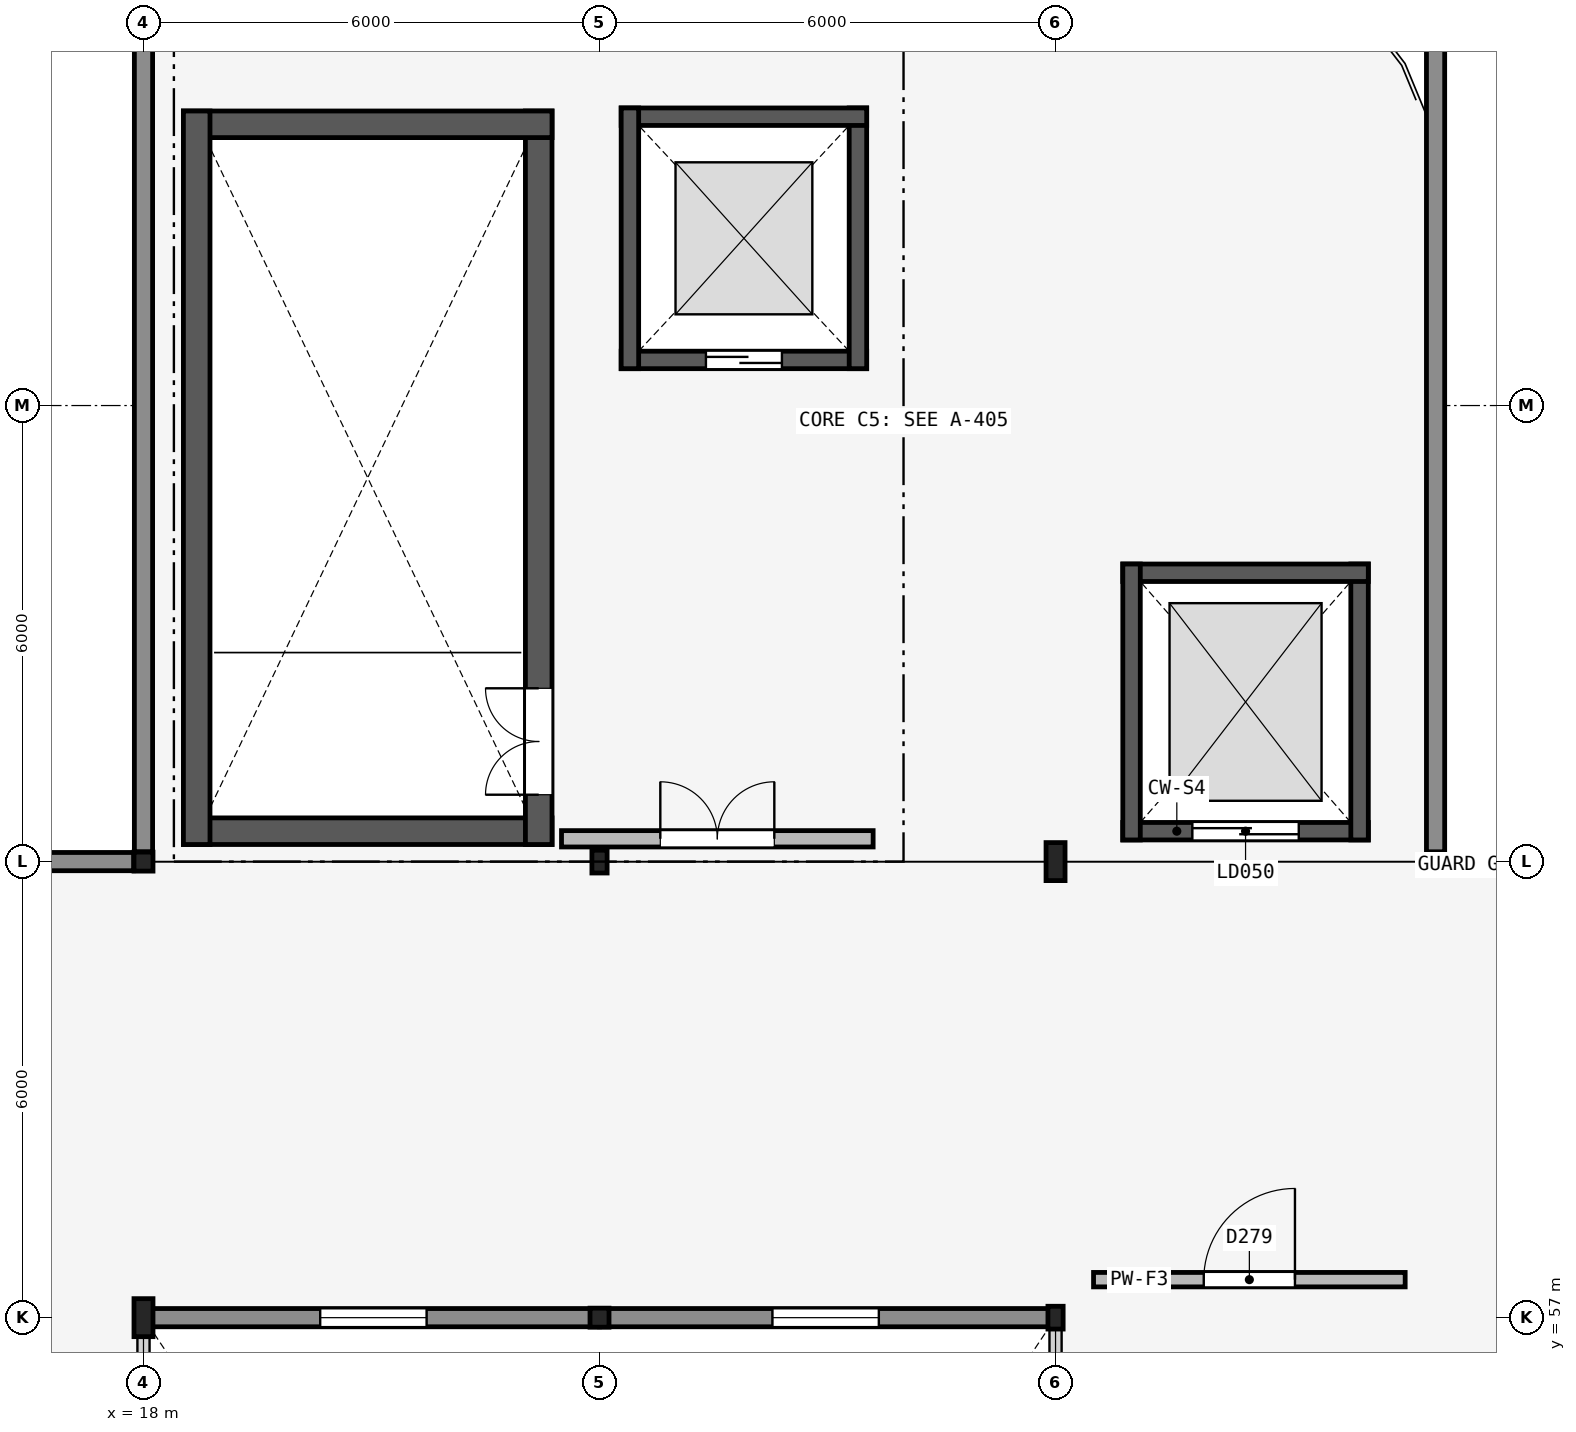
"""IFC4 building model, lengths in metres.
Left out: names, types, materials, properties, quantities, classifications, styles, units other than length and angle.
Written with IfcOpenShell. Run it as: python <this file> out.ifc"""

import sys

from ifc_helpers import new_model, si_unit, direction, frame, frame_2d, origin, origin_2d, place, context, subcontext, project, spatial, rectangle, hollow_rectangle, i_section, extrude, element, fill, save


model = new_model("IFC4")
c1 = context("Model", 3, precision=1e-05, world=origin(), true_north=direction((0.0, 1.0)))
c2 = subcontext(c1, "Body", "Model", "MODEL_VIEW")
j1 = project(units=[si_unit("LENGTHUNIT", "METRE"), si_unit("PLANEANGLEUNIT", "RADIAN")], contexts=[c1])
p1 = place(None, origin())
s1 = spatial("IfcSite", under=j1, at=p1, CompositionType="ELEMENT")
p2 = place(p1, origin())
s2 = spatial("IfcBuilding", under=s1, at=p2, CompositionType="ELEMENT")
p3 = place(p2, frame((0.0, 0.0, 22.2)))
s3 = spatial("IfcBuildingStorey", under=s2, at=p3, CompositionType="ELEMENT", Elevation=22.2)
p4 = place(p3, frame((18.0, 57.0, 0.0), z_axis=(0.0, 0.0, 1.0), x_axis=(1.0, 0.0, 0.0)))
e1 = element("IfcColumn", 1, at=p4, inside=s3, PredefinedType="COLUMN", context=c2, shape_type="SweptSolid", body=[
    extrude(i_section(OverallWidth=0.25, OverallDepth=0.5, WebThickness=0.01, FlangeThickness=0.015, FilletRadius=0.015, at=origin_2d()), origin(), (0.0, 0.0, 1.0), 3.9),
])
for number, where, z_axis, x_axis in (
    (2, (18.0, 63.0, 0.0), (0.0, 0.0, 1.0), (1.0, 0.0, 0.0)),
    (3, (24.0, 57.0, 0.0), (0.0, 0.0, 1.0), (1.0, 0.0, 0.0)),
):
    element("IfcColumn", number, at=place(p3, frame(where, z_axis=z_axis, x_axis=x_axis)), inside=s3, PredefinedType="COLUMN", context=c2, shape_type="SweptSolid", body=[
        extrude(hollow_rectangle(XDim=0.25, YDim=0.25, WallThickness=0.012, InnerFilletRadius=0.012, OuterFilletRadius=0.024, at=origin_2d()), origin(), (0.0, 0.0, 1.0), 3.9),
    ])
for number, where, z_axis, x_axis in (
    (4, (24.0, 63.0, 0.0), (0.0, 0.0, 1.0), (1.0, 0.0, 0.0)),
    (5, (30.0, 57.0, 0.0), (0.0, 0.0, 1.0), (1.0, 0.0, 0.0)),
):
    element("IfcColumn", number, at=place(p3, frame(where, z_axis=z_axis, x_axis=x_axis)), inside=s3, PredefinedType="COLUMN", context=c2, shape_type="SweptSolid", body=[
        extrude(hollow_rectangle(XDim=0.2, YDim=0.3, WallThickness=0.012, InnerFilletRadius=0.012, OuterFilletRadius=0.024, at=origin_2d()), origin(), (0.0, 0.0, 1.0), 3.9),
    ])
p5 = place(p3, frame((30.0, 63.0, 0.0), z_axis=(0.0, 0.0, 1.0), x_axis=(1.0, 0.0, 0.0)))
e6 = element("IfcColumn", 6, at=p5, inside=s3, PredefinedType="COLUMN", context=c2, shape_type="SweptSolid", body=[
    extrude(i_section(OverallWidth=0.25, OverallDepth=0.5, WebThickness=0.01, FlangeThickness=0.015, FilletRadius=0.015, at=origin_2d()), origin(), (0.0, 0.0, 1.0), 3.9),
])
p6 = place(p3, frame((12.129, 63.0, 0.0), z_axis=(0.0, 0.0, 1.0), x_axis=(1.0, 0.0, 0.0)))
e7 = element("IfcWall", 7, at=p6, inside=s3, PredefinedType="SOLIDWALL", context=c2, shape_type="SweptSolid", body=[
    extrude(rectangle(XDim=5.742, YDim=0.24, at=frame_2d((2.871, 0.0))), origin(), (0.0, 0.0, 1.0), 3.08),
])
p7 = place(p6, frame((2.421, 0.0, 1.0)))
e8 = element("IfcOpeningElement", 8, at=p7, cuts=e7, PredefinedType="OPENING", context=c2, shape_type="SweptSolid", body=[
    extrude(rectangle(XDim=0.9, YDim=1.5, at=frame_2d((0.45, 0.75))), frame((0.0, 0.13, 0.0), z_axis=(0.0, -1.0, 0.0), x_axis=(1.0, 0.0, 0.0)), (0.0, 0.0, 1.0), 0.26),
])
p8 = place(p3, frame((18.05, 57.0, 0.0), z_axis=(0.0, 0.0, 1.0), x_axis=(1.0, 0.0, 0.0)))
e9 = element("IfcWall", 9, at=p8, inside=s3, PredefinedType="SOLIDWALL", context=c2, shape_type="SweptSolid", body=[
    extrude(rectangle(XDim=5.95, YDim=0.24, at=frame_2d((2.975, 0.0))), origin(), (0.0, 0.0, 1.0), 3.08),
])
p9 = place(p8, frame((2.275, 0.0, 0.85)))
e10 = element("IfcOpeningElement", 10, at=p9, cuts=e9, PredefinedType="OPENING", context=c2, shape_type="SweptSolid", body=[
    extrude(rectangle(XDim=1.4, YDim=1.8, at=frame_2d((0.7, 0.9))), frame((0.0, 0.13, 0.0), z_axis=(0.0, -1.0, 0.0), x_axis=(1.0, 0.0, 0.0)), (0.0, 0.0, 1.0), 0.26),
])
p10 = place(p3, frame((24.0, 57.0, 0.0), z_axis=(0.0, 0.0, 1.0), x_axis=(1.0, 0.0, 0.0)))
e11 = element("IfcWall", 11, at=p10, inside=s3, PredefinedType="SOLIDWALL", context=c2, shape_type="SweptSolid", body=[
    extrude(rectangle(XDim=5.95, YDim=0.24, at=frame_2d((2.975, 0.0))), origin(), (0.0, 0.0, 1.0), 3.13),
])
p11 = place(p10, frame((2.275, 0.0, 0.85)))
e12 = element("IfcOpeningElement", 12, at=p11, cuts=e11, PredefinedType="OPENING", context=c2, shape_type="SweptSolid", body=[
    extrude(rectangle(XDim=1.4, YDim=1.8, at=frame_2d((0.7, 0.9))), frame((0.0, 0.13, 0.0), z_axis=(0.0, -1.0, 0.0), x_axis=(1.0, 0.0, 0.0)), (0.0, 0.0, 1.0), 0.26),
])
p12 = place(p3, frame((35.0, 63.129, 0.0), z_axis=(0.0, 0.0, 1.0), x_axis=(0.0, 1.0, 0.0)))
e13 = element("IfcWall", 13, at=p12, inside=s3, PredefinedType="SOLIDWALL", context=c2, shape_type="SweptSolid", body=[
    extrude(rectangle(XDim=11.746, YDim=0.24, at=frame_2d((5.873, 0.0))), origin(), (0.0, 0.0, 1.0), 3.28),
])
p13 = place(p3, frame((18.0, 63.129, 0.0), z_axis=(0.0, 0.0, 1.0), x_axis=(0.0, 1.0, 0.0)))
e14 = element("IfcWall", 14, at=p13, inside=s3, PredefinedType="SOLIDWALL", context=c2, shape_type="SweptSolid", body=[
    extrude(rectangle(XDim=11.746, YDim=0.24, at=frame_2d((5.873, 0.0))), origin(), (0.0, 0.0, 1.0), 3.08),
])
p14 = place(p3, frame((18.525, 63.4, 0.0), z_axis=(0.0, 0.0, 1.0), x_axis=(1.0, 0.0, 0.0)))
e15 = element("IfcWall", 15, at=p14, inside=s3, PredefinedType="SHEAR", context=c2, shape_type="SweptSolid", body=[
    extrude(rectangle(XDim=4.85, YDim=0.35, at=frame_2d((2.425, 0.0))), origin(), (0.0, 0.0, 1.0), 3.76),
])
p15 = place(p3, frame((23.2, 63.225, 0.0), z_axis=(0.0, 0.0, 1.0), x_axis=(0.0, 1.0, 0.0)))
e16 = element("IfcWall", 16, at=p15, inside=s3, PredefinedType="SHEAR", context=c2, shape_type="SweptSolid", body=[
    extrude(rectangle(XDim=9.65, YDim=0.35, at=frame_2d((4.825, 0.0))), origin(), (0.0, 0.0, 1.0), 3.76),
])
p16 = place(p15, frame((0.655, 0.0, 0.0)))
e17 = element("IfcOpeningElement", 17, at=p16, cuts=e16, PredefinedType="OPENING", context=c2, shape_type="SweptSolid", body=[
    extrude(rectangle(XDim=1.4, YDim=2.2, at=frame_2d((0.7, 1.1))), frame((0.0, 0.185, 0.0), z_axis=(0.0, -1.0, 0.0), x_axis=(1.0, 0.0, 0.0)), (0.0, 0.0, 1.0), 0.37),
])
p17 = place(p3, frame((23.375, 72.7, 0.0), z_axis=(0.0, 0.0, 1.0), x_axis=(-1.0, 0.0, 0.0)))
e18 = element("IfcWall", 18, at=p17, inside=s3, PredefinedType="SHEAR", context=c2, shape_type="SweptSolid", body=[
    extrude(rectangle(XDim=4.85, YDim=0.35, at=frame_2d((2.425, 0.0))), origin(), (0.0, 0.0, 1.0), 3.76),
])
p18 = place(p3, frame((18.7, 72.875, 0.0), z_axis=(0.0, 0.0, 1.0), x_axis=(0.0, -1.0, 0.0)))
e19 = element("IfcWall", 19, at=p18, inside=s3, PredefinedType="SHEAR", context=c2, shape_type="SweptSolid", body=[
    extrude(rectangle(XDim=9.65, YDim=0.35, at=frame_2d((4.825, 0.0))), origin(), (0.0, 0.0, 1.0), 3.76),
])
p19 = place(p3, frame((23.5, 63.3, 0.0), z_axis=(0.0, 0.0, 1.0), x_axis=(1.0, 0.0, 0.0)))
e20 = element("IfcWall", 20, at=p19, inside=s3, PredefinedType="PARTITIONING", context=c2, shape_type="SweptSolid", body=[
    extrude(rectangle(XDim=4.1, YDim=0.215, at=frame_2d((2.05, 0.0))), origin(), (0.0, 0.0, 1.0), 3.68),
])
p20 = place(p19, frame((1.3, 0.0, 0.0)))
e21 = element("IfcOpeningElement", 21, at=p20, cuts=e20, PredefinedType="OPENING", context=c2, shape_type="SweptSolid", body=[
    extrude(rectangle(XDim=1.5, YDim=2.15, at=frame_2d((0.75, 1.075))), frame((0.0, 0.117, 0.0), z_axis=(0.0, -1.0, 0.0), x_axis=(1.0, 0.0, 0.0)), (0.0, 0.0, 1.0), 0.235),
])
p21 = place(p3, frame((24.285, 69.6, 0.0), z_axis=(0.0, 0.0, 1.0), x_axis=(1.0, 0.0, 0.0)))
e22 = element("IfcWall", 22, at=p21, inside=s3, PredefinedType="SHEAR", context=c2, shape_type="SweptSolid", body=[
    extrude(rectangle(XDim=3.23, YDim=0.23, at=frame_2d((1.615, 0.0))), origin(), (0.0, 0.0, 1.0), 3.9),
])
p22 = place(p21, frame((1.115, 0.0, 0.0)))
e23 = element("IfcOpeningElement", 23, at=p22, cuts=e22, PredefinedType="OPENING", context=c2, shape_type="SweptSolid", body=[
    extrude(rectangle(XDim=1.0, YDim=2.15, at=frame_2d((0.5, 1.075))), frame((0.0, 0.125, 0.0), z_axis=(0.0, -1.0, 0.0), x_axis=(1.0, 0.0, 0.0)), (0.0, 0.0, 1.0), 0.25),
])
p23 = place(p3, frame((27.4, 69.485, 0.0), z_axis=(0.0, 0.0, 1.0), x_axis=(0.0, 1.0, 0.0)))
e24 = element("IfcWall", 24, at=p23, inside=s3, PredefinedType="SHEAR", context=c2, shape_type="SweptSolid", body=[
    extrude(rectangle(XDim=3.43, YDim=0.23, at=frame_2d((1.715, 0.0))), origin(), (0.0, 0.0, 1.0), 3.9),
])
p24 = place(p3, frame((27.515, 72.8, 0.0), z_axis=(0.0, 0.0, 1.0), x_axis=(-1.0, 0.0, 0.0)))
e25 = element("IfcWall", 25, at=p24, inside=s3, PredefinedType="SHEAR", context=c2, shape_type="SweptSolid", body=[
    extrude(rectangle(XDim=3.23, YDim=0.23, at=frame_2d((1.615, 0.0))), origin(), (0.0, 0.0, 1.0), 3.9),
])
p25 = place(p3, frame((24.4, 72.915, 0.0), z_axis=(0.0, 0.0, 1.0), x_axis=(0.0, -1.0, 0.0)))
e26 = element("IfcWall", 26, at=p25, inside=s3, PredefinedType="SHEAR", context=c2, shape_type="SweptSolid", body=[
    extrude(rectangle(XDim=3.43, YDim=0.23, at=frame_2d((1.715, 0.0))), origin(), (0.0, 0.0, 1.0), 3.9),
])
p26 = place(p3, frame((30.885, 63.4, 0.0), z_axis=(0.0, 0.0, 1.0), x_axis=(1.0, 0.0, 0.0)))
e27 = element("IfcWall", 27, at=p26, inside=s3, PredefinedType="SHEAR", context=c2, shape_type="SweptSolid", body=[
    extrude(rectangle(XDim=3.23, YDim=0.23, at=frame_2d((1.615, 0.0))), origin(), (0.0, 0.0, 1.0), 3.9),
])
p27 = place(p26, frame((0.915, 0.0, 0.0)))
e28 = element("IfcOpeningElement", 28, at=p27, cuts=e27, PredefinedType="OPENING", context=c2, shape_type="SweptSolid", body=[
    extrude(rectangle(XDim=1.4, YDim=2.3, at=frame_2d((0.7, 1.15))), frame((0.0, 0.125, 0.0), z_axis=(0.0, -1.0, 0.0), x_axis=(1.0, 0.0, 0.0)), (0.0, 0.0, 1.0), 0.25),
])
p28 = place(p3, frame((34.0, 63.285, 0.0), z_axis=(0.0, 0.0, 1.0), x_axis=(0.0, 1.0, 0.0)))
e29 = element("IfcWall", 29, at=p28, inside=s3, PredefinedType="SHEAR", context=c2, shape_type="SweptSolid", body=[
    extrude(rectangle(XDim=3.63, YDim=0.23, at=frame_2d((1.815, 0.0))), origin(), (0.0, 0.0, 1.0), 3.9),
])
p29 = place(p3, frame((34.115, 66.8, 0.0), z_axis=(0.0, 0.0, 1.0), x_axis=(-1.0, 0.0, 0.0)))
e30 = element("IfcWall", 30, at=p29, inside=s3, PredefinedType="SHEAR", context=c2, shape_type="SweptSolid", body=[
    extrude(rectangle(XDim=3.23, YDim=0.23, at=frame_2d((1.615, 0.0))), origin(), (0.0, 0.0, 1.0), 3.9),
])
p30 = place(p3, frame((31.0, 66.915, 0.0), z_axis=(0.0, 0.0, 1.0), x_axis=(0.0, -1.0, 0.0)))
e31 = element("IfcWall", 31, at=p30, inside=s3, PredefinedType="SHEAR", context=c2, shape_type="SweptSolid", body=[
    extrude(rectangle(XDim=3.63, YDim=0.23, at=frame_2d((1.815, 0.0))), origin(), (0.0, 0.0, 1.0), 3.9),
])
p31 = place(p3, frame((30.5, 57.5, 0.0), z_axis=(0.0, 0.0, 1.0), x_axis=(1.0, 0.0, 0.0)))
e32 = element("IfcWall", 32, at=p31, inside=s3, PredefinedType="PARTITIONING", context=c2, shape_type="SweptSolid", body=[
    extrude(rectangle(XDim=4.1, YDim=0.19, at=frame_2d((2.05, 0.0))), origin(), (0.0, 0.0, 1.0), 3.38),
])
p32 = place(p31, frame((1.45, 0.0, 0.0)))
e33 = element("IfcOpeningElement", 33, at=p32, cuts=e32, PredefinedType="OPENING", context=c2, shape_type="SweptSolid", body=[
    extrude(rectangle(XDim=1.2, YDim=2.15, at=frame_2d((0.6, 1.075))), frame((0.0, 0.105, 0.0), z_axis=(0.0, -1.0, 0.0), x_axis=(1.0, 0.0, 0.0)), (0.0, 0.0, 1.0), 0.21),
])
p33 = place(p9, origin())
e34 = element("IfcWindow", 34, at=p33, inside=s3, PartitioningType="SINGLE_PANEL", PredefinedType="WINDOW", context=c2, shape_type="SweptSolid", body=[
    extrude(rectangle(XDim=1.4, YDim=1.8, at=frame_2d((0.7, 0.9))), frame((0.0, 0.03, 0.0), z_axis=(0.0, -1.0, 0.0), x_axis=(1.0, 0.0, 0.0)), (0.0, 0.0, 1.0), 0.06),
])
fill(e10, e34)
p34 = place(p11, origin())
e35 = element("IfcWindow", 35, at=p34, inside=s3, PartitioningType="SINGLE_PANEL", PredefinedType="WINDOW", context=c2, shape_type="SweptSolid", body=[
    extrude(rectangle(XDim=1.4, YDim=1.8, at=frame_2d((0.7, 0.9))), frame((0.0, 0.03, 0.0), z_axis=(0.0, -1.0, 0.0), x_axis=(1.0, 0.0, 0.0)), (0.0, 0.0, 1.0), 0.06),
])
fill(e12, e35)
p35 = place(p16, origin())
e36 = element("IfcDoor", 36, at=p35, inside=s3, OperationType="DOUBLE_DOOR_SINGLE_SWING", PredefinedType="DOOR", context=c2, shape_type="SweptSolid", body=[
    extrude(rectangle(XDim=1.4, YDim=2.2, at=frame_2d((0.7, 1.1))), frame((0.0, 0.025, 0.0), z_axis=(0.0, -1.0, 0.0), x_axis=(1.0, 0.0, 0.0)), (0.0, 0.0, 1.0), 0.05),
])
fill(e17, e36)
p36 = place(p20, origin())
e37 = element("IfcDoor", 37, at=p36, inside=s3, OperationType="DOUBLE_DOOR_SINGLE_SWING", PredefinedType="DOOR", context=c2, shape_type="SweptSolid", body=[
    extrude(rectangle(XDim=1.5, YDim=2.15, at=frame_2d((0.75, 1.075))), frame((0.0, 0.025, 0.0), z_axis=(0.0, -1.0, 0.0), x_axis=(1.0, 0.0, 0.0)), (0.0, 0.0, 1.0), 0.05),
])
fill(e21, e37)
p37 = place(p22, origin())
e38 = element("IfcDoor", 38, at=p37, inside=s3, OperationType="SLIDING_TO_LEFT", PredefinedType="DOOR", context=c2, shape_type="SweptSolid", body=[
    extrude(rectangle(XDim=1.0, YDim=2.15, at=frame_2d((0.5, 1.075))), frame((0.0, 0.025, 0.0), z_axis=(0.0, -1.0, 0.0), x_axis=(1.0, 0.0, 0.0)), (0.0, 0.0, 1.0), 0.05),
])
fill(e23, e38)
p38 = place(p27, origin())
e39 = element("IfcDoor", 39, at=p38, inside=s3, OperationType="SLIDING_TO_LEFT", PredefinedType="DOOR", context=c2, shape_type="SweptSolid", body=[
    extrude(rectangle(XDim=1.4, YDim=2.3, at=frame_2d((0.7, 1.15))), frame((0.0, 0.025, 0.0), z_axis=(0.0, -1.0, 0.0), x_axis=(1.0, 0.0, 0.0)), (0.0, 0.0, 1.0), 0.05),
])
fill(e28, e39)
p39 = place(p32, origin())
e40 = element("IfcDoor", 40, at=p39, inside=s3, OperationType="SINGLE_SWING_RIGHT", PredefinedType="DOOR", context=c2, shape_type="SweptSolid", body=[
    extrude(rectangle(XDim=1.2, YDim=2.15, at=frame_2d((0.6, 1.075))), frame((0.0, 0.025, 0.0), z_axis=(0.0, -1.0, 0.0), x_axis=(1.0, 0.0, 0.0)), (0.0, 0.0, 1.0), 0.05),
])
fill(e33, e40)
save(model, sys.argv[1])
